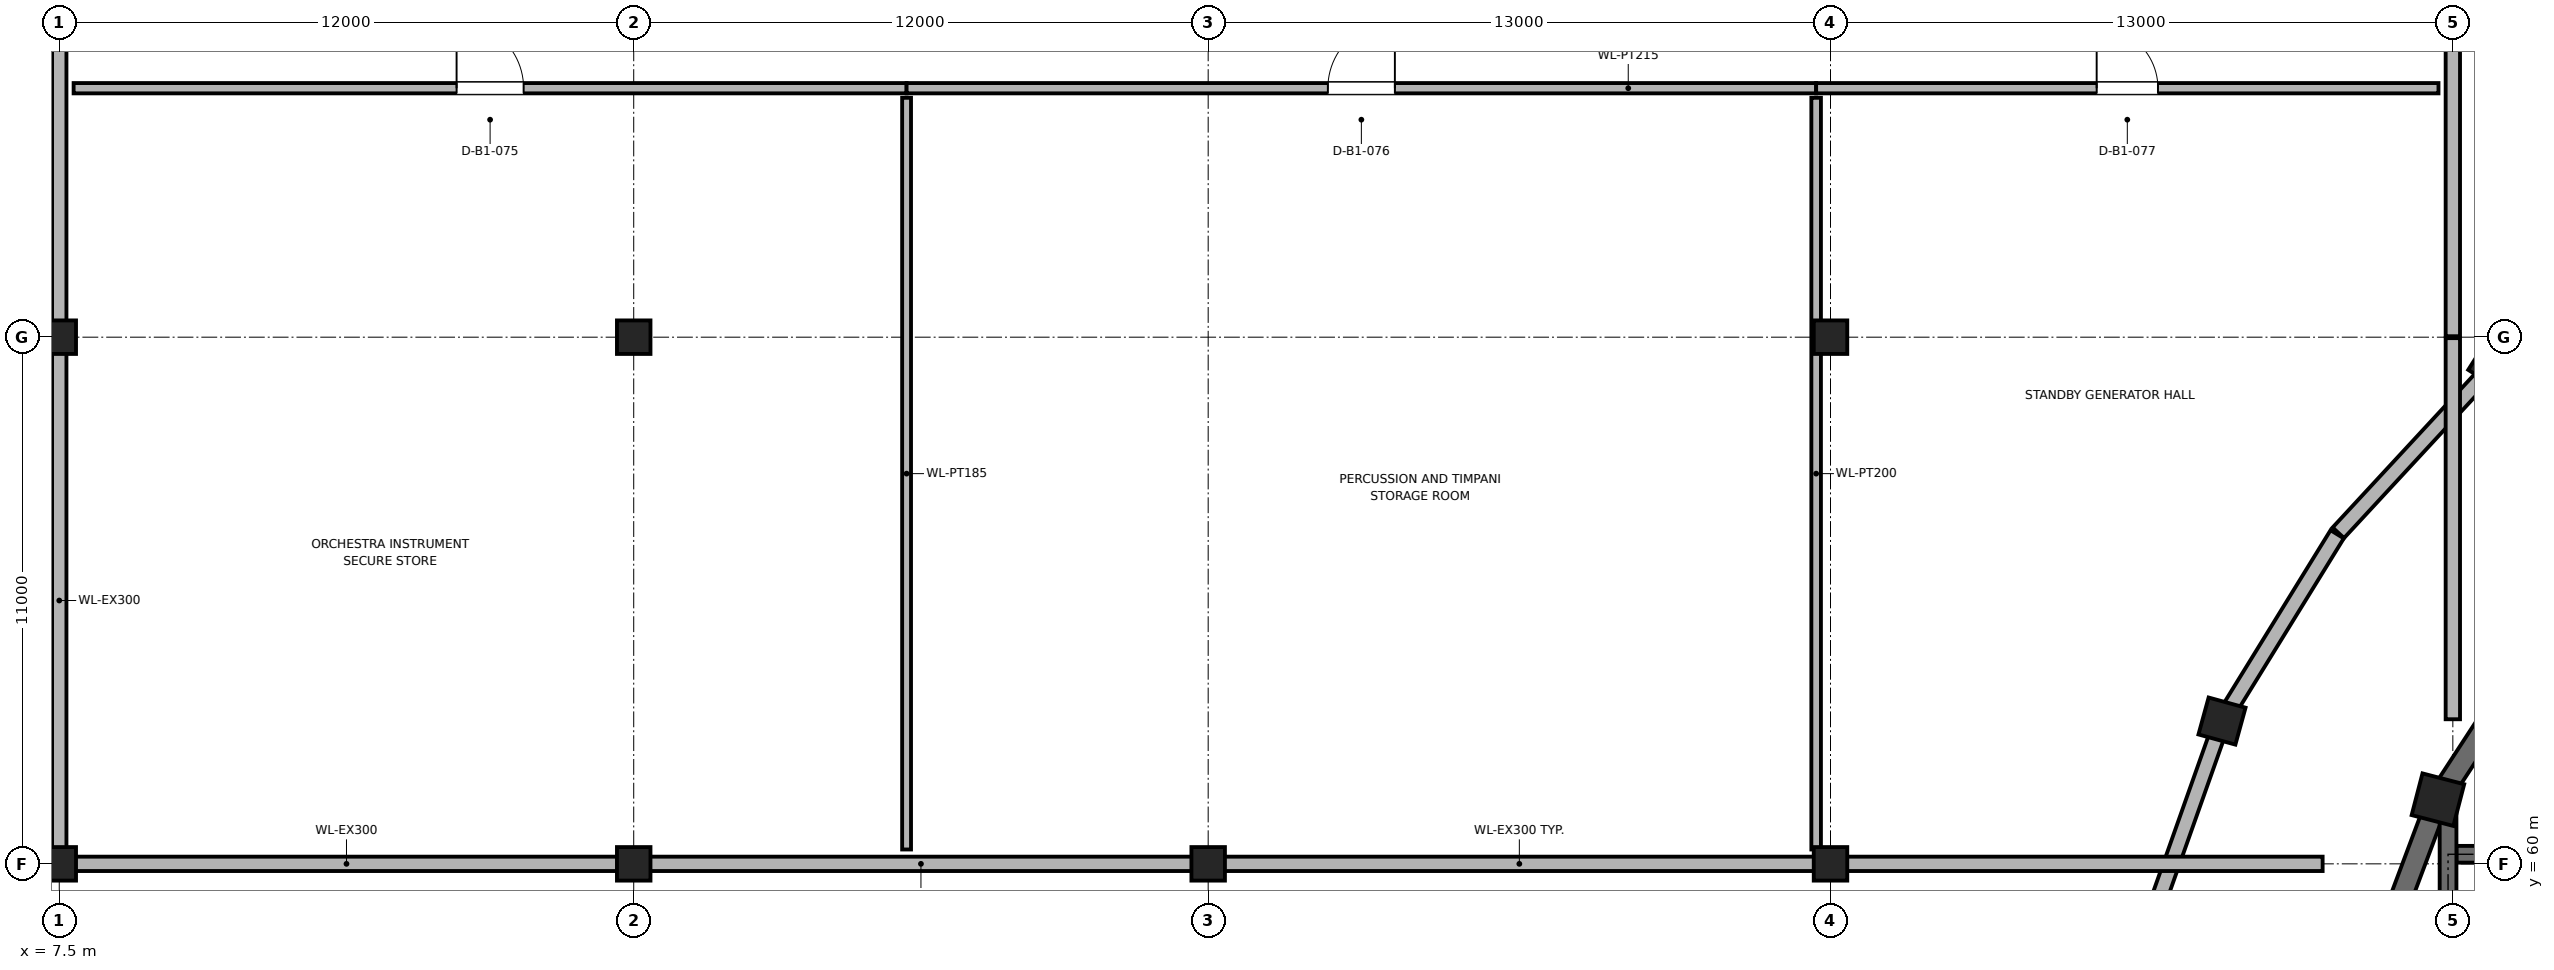
"""IFC4 building model, lengths in metres.
Left out: names, types, materials, properties, quantities, classifications, styles, units other than length and angle.
Written with IfcOpenShell. Run it as: python <this file> out.ifc"""

import sys

from ifc_helpers import new_model, si_unit, direction, frame, frame_2d, origin, origin_2d, place, context, subcontext, project, spatial, rectangle, circle, extrude, element, fill, save


model = new_model("IFC4")
c1 = context("Model", 3, precision=1e-05, world=origin(), true_north=direction((0.0, 1.0)))
c2 = subcontext(c1, "Body", "Model", "MODEL_VIEW")
j1 = project(units=[si_unit("LENGTHUNIT", "METRE"), si_unit("PLANEANGLEUNIT", "RADIAN")], contexts=[c1])
p1 = place(None, origin())
s1 = spatial("IfcSite", under=j1, at=p1, CompositionType="ELEMENT")
p2 = place(p1, origin())
s2 = spatial("IfcBuilding", under=s1, at=p2, CompositionType="ELEMENT")
p3 = place(p2, frame((0.0, 0.0, -4.8)))
s3 = spatial("IfcBuildingStorey", under=s2, at=p3, CompositionType="ELEMENT", Elevation=-4.8)
p4 = place(p3, frame((52.678, 62.982, 0.0), z_axis=(0.0, 0.0, 1.0), x_axis=(-0.964141737836, 0.265387847052, 0.0)))
e1 = element("IfcColumn", 1, at=p4, inside=s3, PredefinedType="COLUMN", context=c2, shape_type="SweptSolid", body=[
    extrude(circle(Radius=0.4, at=origin_2d()), origin(), (0.0, 0.0, 1.0), 4.8),
])
p5 = place(p3, frame((57.189, 61.34, 0.0), z_axis=(0.0, 0.0, 1.0), x_axis=(-0.967841021032, 0.251562632376, 0.0)))
e2 = element("IfcColumn", 2, at=p5, inside=s3, PredefinedType="COLUMN", context=c2, shape_type="SweptSolid", body=[
    extrude(rectangle(XDim=0.9, YDim=0.9, at=origin_2d()), origin(), (0.0, 0.0, 1.0), 4.8),
])
for number, where, z_axis, x_axis in (
    (3, (7.5, 60.0, 0.0), (0.0, 0.0, 1.0), (1.0, 0.0, 0.0)),
    (4, (7.5, 71.0, 0.0), (0.0, 0.0, 1.0), (1.0, 0.0, 0.0)),
    (5, (19.5, 60.0, 0.0), (0.0, 0.0, 1.0), (1.0, 0.0, 0.0)),
    (6, (19.5, 71.0, 0.0), (0.0, 0.0, 1.0), (1.0, 0.0, 0.0)),
    (7, (31.5, 60.0, 0.0), (0.0, 0.0, 1.0), (1.0, 0.0, 0.0)),
    (8, (44.5, 60.0, 0.0), (0.0, 0.0, 1.0), (1.0, 0.0, 0.0)),
    (9, (44.5, 71.0, 0.0), (0.0, 0.0, 1.0), (1.0, 0.0, 0.0)),
):
    element("IfcColumn", number, at=place(p3, frame(where, z_axis=z_axis, x_axis=x_axis)), inside=s3, PredefinedType="COLUMN", context=c2, shape_type="SweptSolid", body=[
        extrude(rectangle(XDim=0.7, YDim=0.7, at=origin_2d()), origin(), (0.0, 0.0, 1.0), 4.8),
    ])
p6 = place(p3, frame((59.251, 64.5, 0.0), z_axis=(0.0, 0.0, 1.0), x_axis=(-0.546611158382, -0.837386554425, 0.0)))
e10 = element("IfcWall", 10, at=p6, inside=s3, PredefinedType="SHEAR", context=c2, shape_type="SweptSolid", body=[
    extrude(rectangle(XDim=3.773, YDim=0.45, at=frame_2d((1.887, 0.0))), origin(), (0.0, 0.0, 1.0), 4.5),
])
p7 = place(p3, frame((57.189, 61.34, 0.0), z_axis=(0.0, 0.0, 1.0), x_axis=(-0.351279653979, -0.936270583058, 0.0)))
e11 = element("IfcWall", 11, at=p7, inside=s3, PredefinedType="SHEAR", context=c2, shape_type="SweptSolid", body=[
    extrude(rectangle(XDim=3.597, YDim=0.45, at=frame_2d((1.798, 0.0))), origin(), (0.0, 0.0, 1.0), 4.5),
])
p8 = place(p3, frame((55.108, 66.915, 0.0), z_axis=(0.0, 0.0, 1.0), x_axis=(0.679476177226, 0.733697570244, 0.0)))
e12 = element("IfcWall", 12, at=p8, inside=s3, PredefinedType="SOLIDWALL", context=c2, shape_type="SweptSolid", body=[
    extrude(rectangle(XDim=4.786, YDim=0.325, at=frame_2d((2.393, 0.0))), origin(), (0.0, 0.0, 1.0), 3.638),
])
p9 = place(p3, frame((52.689, 62.999, 0.0), z_axis=(0.0, 0.0, 1.0), x_axis=(0.524906145614, 0.851160113197, 0.0)))
e13 = element("IfcWall", 13, at=p9, inside=s3, PredefinedType="SOLIDWALL", context=c2, shape_type="SweptSolid", body=[
    extrude(rectangle(XDim=4.563, YDim=0.325, at=frame_2d((2.282, 0.0))), origin(), (0.0, 0.0, 1.0), 3.938),
])
p10 = place(p3, frame((51.205, 58.825, 0.0), z_axis=(0.0, 0.0, 1.0), x_axis=(0.334024212389, 0.9425644941, 0.0)))
e14 = element("IfcWall", 14, at=p10, inside=s3, PredefinedType="SOLIDWALL", context=c2, shape_type="SweptSolid", body=[
    extrude(rectangle(XDim=4.39, YDim=0.325, at=frame_2d((2.195, 0.0))), origin(), (0.0, 0.0, 1.0), 3.638),
])
p11 = place(p3, frame((19.48, 60.0, 0.0), z_axis=(0.0, 0.0, 1.0), x_axis=(-1.0, 0.0, 0.0)))
e15 = element("IfcWall", 15, at=p11, inside=s3, PredefinedType="SOLIDWALL", context=c2, shape_type="SweptSolid", body=[
    extrude(rectangle(XDim=11.96, YDim=0.3, at=frame_2d((5.98, 0.0))), origin(), (0.0, 0.0, 1.0), 3.638),
])
p12 = place(p3, frame((31.48, 60.0, 0.0), z_axis=(0.0, 0.0, 1.0), x_axis=(-1.0, 0.0, 0.0)))
e16 = element("IfcWall", 16, at=p12, inside=s3, PredefinedType="SOLIDWALL", context=c2, shape_type="SweptSolid", body=[
    extrude(rectangle(XDim=11.96, YDim=0.3, at=frame_2d((5.98, 0.0))), origin(), (0.0, 0.0, 1.0), 3.388),
])
p13 = place(p3, frame((44.48, 60.0, 0.0), z_axis=(0.0, 0.0, 1.0), x_axis=(-1.0, 0.0, 0.0)))
e17 = element("IfcWall", 17, at=p13, inside=s3, PredefinedType="SOLIDWALL", context=c2, shape_type="SweptSolid", body=[
    extrude(rectangle(XDim=12.96, YDim=0.3, at=frame_2d((6.48, 0.0))), origin(), (0.0, 0.0, 1.0), 3.388),
])
p14 = place(p3, frame((54.78, 60.0, 0.0), z_axis=(0.0, 0.0, 1.0), x_axis=(-1.0, 0.0, 0.0)))
e18 = element("IfcWall", 18, at=p14, inside=s3, PredefinedType="SOLIDWALL", context=c2, shape_type="SweptSolid", body=[
    extrude(rectangle(XDim=10.26, YDim=0.3, at=frame_2d((5.13, 0.0))), origin(), (0.0, 0.0, 1.0), 3.638),
])
p15 = place(p3, frame((57.5, 70.98, 0.0), z_axis=(0.0, 0.0, 1.0), x_axis=(0.0, -1.0, 0.0)))
e19 = element("IfcWall", 19, at=p15, inside=s3, PredefinedType="SOLIDWALL", context=c2, shape_type="SweptSolid", body=[
    extrude(rectangle(XDim=7.96, YDim=0.3, at=frame_2d((3.98, 0.0))), origin(), (0.0, 0.0, 1.0), 3.638),
])
for number, where, z_axis, x_axis in (
    (20, (57.5, 81.98, 0.0), (0.0, 0.0, 1.0), (0.0, -1.0, 0.0)),
    (21, (7.5, 71.02, 0.0), (0.0, 0.0, 1.0), (0.0, 1.0, 0.0)),
    (22, (7.5, 60.02, 0.0), (0.0, 0.0, 1.0), (0.0, 1.0, 0.0)),
):
    element("IfcWall", number, at=place(p3, frame(where, z_axis=z_axis, x_axis=x_axis)), inside=s3, PredefinedType="SOLIDWALL", context=c2, shape_type="SweptSolid", body=[
        extrude(rectangle(XDim=10.96, YDim=0.3, at=frame_2d((5.48, 0.0))), origin(), (0.0, 0.0, 1.0), 3.638),
    ])
p16 = place(p3, frame((57.575, 60.2, 0.0), z_axis=(0.0, 0.0, 1.0), x_axis=(1.0, 0.0, 0.0)))
e23 = element("IfcWall", 23, at=p16, inside=s3, PredefinedType="SHEAR", context=c2, shape_type="SweptSolid", body=[
    extrude(rectangle(XDim=6.45, YDim=0.35, at=frame_2d((3.225, 0.0))), origin(), (0.0, 0.0, 1.0), 4.5),
])
p17 = place(p16, frame((1.15, 0.0, 0.0)))
e24 = element("IfcOpeningElement", 24, at=p17, cuts=e23, PredefinedType="OPENING", context=c2, shape_type="SweptSolid", body=[
    extrude(rectangle(XDim=1.35, YDim=2.2, at=frame_2d((0.675, 1.1))), frame((0.0, 0.185, 0.0), z_axis=(0.0, -1.0, 0.0), x_axis=(1.0, 0.0, 0.0)), (0.0, 0.0, 1.0), 0.37),
])
p18 = place(p16, frame((5.28, 0.0, 0.0)))
e25 = element("IfcOpeningElement", 25, at=p18, cuts=e23, PredefinedType="OPENING", context=c2, shape_type="SweptSolid", body=[
    extrude(rectangle(XDim=0.95, YDim=2.12, at=frame_2d((0.475, 1.06))), frame((0.0, 0.185, 0.0), z_axis=(0.0, -1.0, 0.0), x_axis=(1.0, 0.0, 0.0)), (0.0, 0.0, 1.0), 0.37),
])
p19 = place(p3, frame((57.4, 48.775, 0.0), z_axis=(0.0, 0.0, 1.0), x_axis=(0.0, 1.0, 0.0)))
e26 = element("IfcWall", 26, at=p19, inside=s3, PredefinedType="SHEAR", context=c2, shape_type="SweptSolid", body=[
    extrude(rectangle(XDim=12.565, YDim=0.35, at=frame_2d((6.283, 0.0))), origin(), (0.0, 0.0, 1.0), 4.5),
])
p20 = place(p3, frame((7.8, 76.2, 0.0), z_axis=(0.0, 0.0, 1.0), x_axis=(1.0, 0.0, 0.0)))
e27 = element("IfcWall", 27, at=p20, inside=s3, PredefinedType="PARTITIONING", context=c2, shape_type="SweptSolid", body=[
    extrude(rectangle(XDim=17.4, YDim=0.215, at=frame_2d((8.7, 0.0))), origin(), (0.0, 0.0, 1.0), 3.64),
])
p21 = place(p20, frame((8.0, 0.0, 0.0)))
e28 = element("IfcOpeningElement", 28, at=p21, cuts=e27, PredefinedType="OPENING", context=c2, shape_type="SweptSolid", body=[
    extrude(rectangle(XDim=1.4, YDim=2.2, at=frame_2d((0.7, 1.1))), frame((0.0, 0.117, 0.0), z_axis=(0.0, -1.0, 0.0), x_axis=(1.0, 0.0, 0.0)), (0.0, 0.0, 1.0), 0.235),
])
p22 = place(p3, frame((25.2, 76.2, 0.0), z_axis=(0.0, 0.0, 1.0), x_axis=(1.0, 0.0, 0.0)))
e29 = element("IfcWall", 29, at=p22, inside=s3, PredefinedType="PARTITIONING", context=c2, shape_type="SweptSolid", body=[
    extrude(rectangle(XDim=19.0, YDim=0.215, at=frame_2d((9.5, 0.0))), origin(), (0.0, 0.0, 1.0), 3.39),
])
p23 = place(p22, frame((8.8, 0.0, 0.0)))
e30 = element("IfcOpeningElement", 30, at=p23, cuts=e29, PredefinedType="OPENING", context=c2, shape_type="SweptSolid", body=[
    extrude(rectangle(XDim=1.4, YDim=2.2, at=frame_2d((0.7, 1.1))), frame((0.0, 0.117, 0.0), z_axis=(0.0, -1.0, 0.0), x_axis=(1.0, 0.0, 0.0)), (0.0, 0.0, 1.0), 0.235),
])
p24 = place(p3, frame((44.2, 76.2, 0.0), z_axis=(0.0, 0.0, 1.0), x_axis=(1.0, 0.0, 0.0)))
e31 = element("IfcWall", 31, at=p24, inside=s3, PredefinedType="PARTITIONING", context=c2, shape_type="SweptSolid", body=[
    extrude(rectangle(XDim=13.0, YDim=0.215, at=frame_2d((6.5, 0.0))), origin(), (0.0, 0.0, 1.0), 3.64),
])
p25 = place(p24, frame((5.86, 0.0, 0.0)))
e32 = element("IfcOpeningElement", 32, at=p25, cuts=e31, PredefinedType="OPENING", context=c2, shape_type="SweptSolid", body=[
    extrude(rectangle(XDim=1.28, YDim=2.18, at=frame_2d((0.64, 1.09))), frame((0.0, 0.117, 0.0), z_axis=(0.0, -1.0, 0.0), x_axis=(1.0, 0.0, 0.0)), (0.0, 0.0, 1.0), 0.235),
])
p26 = place(p3, frame((25.2, 60.3, 0.0), z_axis=(0.0, 0.0, 1.0), x_axis=(0.0, 1.0, 0.0)))
e33 = element("IfcWall", 33, at=p26, inside=s3, PredefinedType="PARTITIONING", context=c2, shape_type="SweptSolid", body=[
    extrude(rectangle(XDim=15.7, YDim=0.185, at=frame_2d((7.85, 0.0))), origin(), (0.0, 0.0, 1.0), 3.19),
])
p27 = place(p3, frame((44.2, 60.3, 0.0), z_axis=(0.0, 0.0, 1.0), x_axis=(0.0, 1.0, 0.0)))
e34 = element("IfcWall", 34, at=p27, inside=s3, PredefinedType="PARTITIONING", context=c2, shape_type="SweptSolid", body=[
    extrude(rectangle(XDim=15.7, YDim=0.2, at=frame_2d((7.85, 0.0))), origin(), (0.0, 0.0, 1.0), 3.19),
])
p28 = place(p21, origin())
e35 = element("IfcDoor", 35, at=p28, inside=s3, OperationType="SINGLE_SWING_LEFT", PredefinedType="DOOR", context=c2, shape_type="SweptSolid", body=[
    extrude(rectangle(XDim=1.4, YDim=2.2, at=frame_2d((0.7, 1.1))), frame((0.0, 0.025, 0.0), z_axis=(0.0, -1.0, 0.0), x_axis=(1.0, 0.0, 0.0)), (0.0, 0.0, 1.0), 0.05),
])
fill(e28, e35)
p29 = place(p23, origin())
e36 = element("IfcDoor", 36, at=p29, inside=s3, OperationType="SINGLE_SWING_RIGHT", PredefinedType="DOOR", context=c2, shape_type="SweptSolid", body=[
    extrude(rectangle(XDim=1.4, YDim=2.2, at=frame_2d((0.7, 1.1))), frame((0.0, 0.025, 0.0), z_axis=(0.0, -1.0, 0.0), x_axis=(1.0, 0.0, 0.0)), (0.0, 0.0, 1.0), 0.05),
])
fill(e30, e36)
p30 = place(p25, origin())
e37 = element("IfcDoor", 37, at=p30, inside=s3, OperationType="SINGLE_SWING_LEFT", PredefinedType="DOOR", context=c2, shape_type="SweptSolid", body=[
    extrude(rectangle(XDim=1.28, YDim=2.18, at=frame_2d((0.64, 1.09))), frame((0.0, 0.025, 0.0), z_axis=(0.0, -1.0, 0.0), x_axis=(1.0, 0.0, 0.0)), (0.0, 0.0, 1.0), 0.05),
])
fill(e32, e37)
save(model, sys.argv[1])
